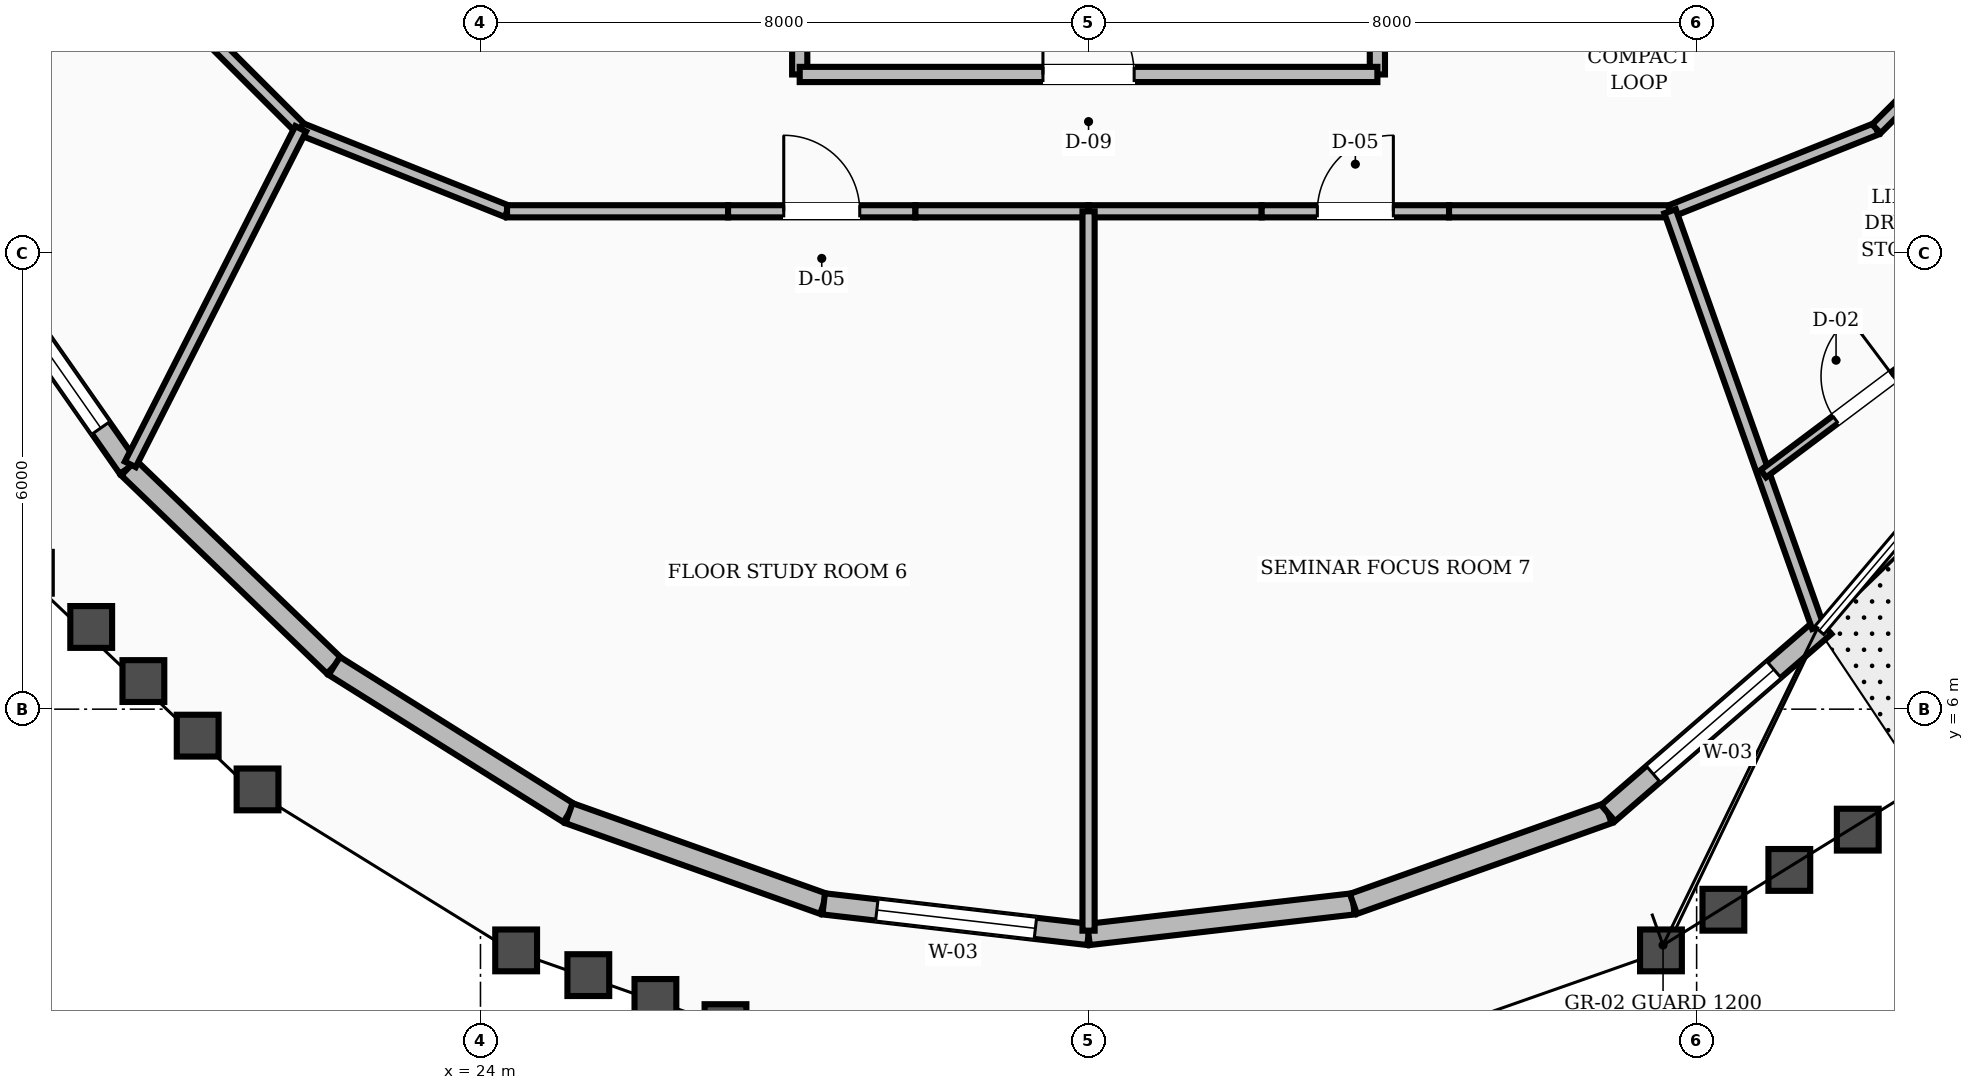
"""IFC4 building model, lengths in metres.
Left out: names, types, materials, properties, quantities, classifications, styles, units other than length and angle.
Written with IfcOpenShell. Run it as: python <this file> out.ifc"""

import sys

from ifc_helpers import new_model, si_unit, direction, frame, frame_2d, origin, place, context, subcontext, project, spatial, rectangle, extrude, element, fill, save


model = new_model("IFC4")
c1 = context("Model", 3, precision=1e-05, world=origin(), true_north=direction((0.0, 1.0)))
c2 = subcontext(c1, "Body", "Model", "MODEL_VIEW")
j1 = project(units=[si_unit("LENGTHUNIT", "METRE"), si_unit("PLANEANGLEUNIT", "RADIAN")], contexts=[c1])
p1 = place(None, origin())
s1 = spatial("IfcSite", under=j1, at=p1, CompositionType="ELEMENT")
p2 = place(p1, origin())
s2 = spatial("IfcBuilding", under=s1, at=p2, CompositionType="ELEMENT")
p3 = place(p2, frame((0.0, 0.0, 290.4)))
s3 = spatial("IfcBuildingStorey", under=s2, at=p3, CompositionType="ELEMENT", Elevation=290.4)
p4 = place(p3, frame((17.149, 12.353, 0.0), z_axis=(0.0, 0.0, 1.0), x_axis=(0.573022646369, -0.819539533365, 0.0)))
e1 = element("IfcWall", 1, at=p4, inside=s3, PredefinedType="STANDARD", context=c2, shape_type="SweptSolid", body=[
    extrude(rectangle(XDim=3.876, YDim=0.28, at=frame_2d((1.938, 0.0))), origin(), (0.0, 0.0, 1.0), 2.88),
])
p5 = place(p4, frame((0.638, 0.0, 0.8)))
e2 = element("IfcOpeningElement", 2, at=p5, cuts=e1, PredefinedType="OPENING", context=c2, shape_type="SweptSolid", body=[
    extrude(rectangle(XDim=2.6, YDim=1.65, at=frame_2d((1.3, 0.825))), frame((0.0, 0.15, 0.0), z_axis=(0.0, -1.0, 0.0), x_axis=(1.0, 0.0, 0.0)), (0.0, 0.0, 1.0), 0.3),
])
p6 = place(p3, frame((19.37, 9.176, 0.0), z_axis=(0.0, 0.0, 1.0), x_axis=(0.720234855693, -0.693730316943, 0.0)))
e3 = element("IfcWall", 3, at=p6, inside=s3, PredefinedType="STANDARD", context=c2, shape_type="SweptSolid", body=[
    extrude(rectangle(XDim=3.758, YDim=0.28, at=frame_2d((1.879, 0.0))), origin(), (0.0, 0.0, 1.0), 2.88),
])
p7 = place(p3, frame((22.077, 6.569, 0.0), z_axis=(0.0, 0.0, 1.0), x_axis=(0.847094045547, -0.531443014818, 0.0)))
e4 = element("IfcWall", 4, at=p7, inside=s3, PredefinedType="STANDARD", context=c2, shape_type="SweptSolid", body=[
    extrude(rectangle(XDim=3.645, YDim=0.28, at=frame_2d((1.823, 0.0))), origin(), (0.0, 0.0, 1.0), 2.88),
])
p8 = place(p3, frame((25.165, 4.632, 0.0), z_axis=(0.0, 0.0, 1.0), x_axis=(0.94207690039, -0.335396949527, 0.0)))
e5 = element("IfcWall", 5, at=p8, inside=s3, PredefinedType="STANDARD", context=c2, shape_type="SweptSolid", body=[
    extrude(rectangle(XDim=3.557, YDim=0.28, at=frame_2d((1.778, 0.0))), origin(), (0.0, 0.0, 1.0), 2.88),
])
p9 = place(p3, frame((28.515, 3.439, 0.0), z_axis=(0.0, 0.0, 1.0), x_axis=(0.993384223019, -0.114838083653, 0.0)))
e6 = element("IfcWall", 6, at=p9, inside=s3, PredefinedType="STANDARD", context=c2, shape_type="SweptSolid", body=[
    extrude(rectangle(XDim=3.508, YDim=0.28, at=frame_2d((1.754, 0.0))), origin(), (0.0, 0.0, 1.0), 2.88),
])
p10 = place(p9, frame((0.704, 0.0, 0.8)))
e7 = element("IfcOpeningElement", 7, at=p10, cuts=e6, PredefinedType="OPENING", context=c2, shape_type="SweptSolid", body=[
    extrude(rectangle(XDim=2.1, YDim=1.65, at=frame_2d((1.05, 0.825))), frame((0.0, 0.15, 0.0), z_axis=(0.0, -1.0, 0.0), x_axis=(1.0, 0.0, 0.0)), (0.0, 0.0, 1.0), 0.3),
])
p11 = place(p3, frame((32.0, 3.036, 0.0), z_axis=(0.0, 0.0, 1.0), x_axis=(0.993384223019, 0.114838083653, 0.0)))
e8 = element("IfcWall", 8, at=p11, inside=s3, PredefinedType="STANDARD", context=c2, shape_type="SweptSolid", body=[
    extrude(rectangle(XDim=3.508, YDim=0.28, at=frame_2d((1.754, 0.0))), origin(), (0.0, 0.0, 1.0), 2.88),
])
p12 = place(p3, frame((35.485, 3.439, 0.0), z_axis=(0.0, 0.0, 1.0), x_axis=(0.94207690039, 0.335396949527, 0.0)))
e9 = element("IfcWall", 9, at=p12, inside=s3, PredefinedType="STANDARD", context=c2, shape_type="SweptSolid", body=[
    extrude(rectangle(XDim=3.557, YDim=0.28, at=frame_2d((1.778, 0.0))), origin(), (0.0, 0.0, 1.0), 2.88),
])
p13 = place(p3, frame((38.835, 4.632, 0.0), z_axis=(0.0, 0.0, 1.0), x_axis=(0.756185346013, 0.654357488286, 0.0)))
e10 = element("IfcWall", 10, at=p13, inside=s3, PredefinedType="STANDARD", context=c2, shape_type="SweptSolid", body=[
    extrude(rectangle(XDim=3.764, YDim=0.28, at=frame_2d((1.882, 0.0))), origin(), (0.0, 0.0, 1.0), 2.88),
])
p14 = place(p13, frame((0.786, 0.0, 0.8)))
e11 = element("IfcOpeningElement", 11, at=p14, cuts=e10, PredefinedType="OPENING", context=c2, shape_type="SweptSolid", body=[
    extrude(rectangle(XDim=2.1, YDim=1.65, at=frame_2d((1.05, 0.825))), frame((0.0, 0.15, 0.0), z_axis=(0.0, -1.0, 0.0), x_axis=(1.0, 0.0, 0.0)), (0.0, 0.0, 1.0), 0.3),
])
for number, where, z_axis, x_axis in (
    (12, (28.2, 14.35, 0.0), (0.0, 0.0, 1.0), (0.0, 1.0, 0.0)),
    (13, (35.8, 14.35, 0.0), (0.0, 0.0, 1.0), (0.0, 1.0, 0.0)),
):
    element("IfcWall", number, at=place(p3, frame(where, z_axis=z_axis, x_axis=x_axis)), inside=s3, PredefinedType="SOLIDWALL", context=c2, shape_type="SweptSolid", body=[
        extrude(rectangle(XDim=2.2, YDim=0.2, at=frame_2d((1.1, 0.0))), origin(), (0.0, 0.0, 1.0), 2.87),
    ])
p15 = place(p3, frame((28.2, 14.35, 0.0), z_axis=(0.0, 0.0, 1.0), x_axis=(1.0, 0.0, 0.0)))
e14 = element("IfcWall", 14, at=p15, inside=s3, PredefinedType="SOLIDWALL", context=c2, shape_type="SweptSolid", body=[
    extrude(rectangle(XDim=7.6, YDim=0.2, at=frame_2d((3.8, 0.0))), origin(), (0.0, 0.0, 1.0), 2.87),
])
p16 = place(p15, frame((3.2, 0.0, 0.0)))
e15 = element("IfcOpeningElement", 15, at=p16, cuts=e14, PredefinedType="OPENING", context=c2, shape_type="SweptSolid", body=[
    extrude(rectangle(XDim=1.2, YDim=2.1, at=frame_2d((0.6, 1.05))), frame((0.0, 0.11, 0.0), z_axis=(0.0, -1.0, 0.0), x_axis=(1.0, 0.0, 0.0)), (0.0, 0.0, 1.0), 0.22),
])
p17 = place(p3, frame((19.573, 15.697, 0.0), z_axis=(0.0, 0.0, 1.0), x_axis=(0.707106781187, -0.707106781187, 0.0)))
e16 = element("IfcWall", 16, at=p17, inside=s3, PredefinedType="SOLIDWALL", context=c2, shape_type="SweptSolid", body=[
    extrude(rectangle(XDim=2.916, YDim=0.16, at=frame_2d((1.458, 0.0))), origin(), (0.0, 0.0, 1.0), 2.87),
])
p18 = place(p3, frame((21.635, 13.635, 0.0), z_axis=(0.0, 0.0, 1.0), x_axis=(0.92856882165, -0.371160266542, 0.0)))
e17 = element("IfcWall", 17, at=p18, inside=s3, PredefinedType="SOLIDWALL", context=c2, shape_type="SweptSolid", body=[
    extrude(rectangle(XDim=2.923, YDim=0.16, at=frame_2d((1.461, 0.0))), origin(), (0.0, 0.0, 1.0), 2.87),
])
p19 = place(p3, frame((24.349, 12.55, 0.0), z_axis=(0.0, 0.0, 1.0), x_axis=(1.0, 0.0, 0.0)))
e18 = element("IfcWall", 18, at=p19, inside=s3, PredefinedType="SOLIDWALL", context=c2, shape_type="SweptSolid", body=[
    extrude(rectangle(XDim=2.908, YDim=0.16, at=frame_2d((1.454, 0.0))), origin(), (0.0, 0.0, 1.0), 2.87),
])
p20 = place(p3, frame((27.257, 12.55, 0.0), z_axis=(0.0, 0.0, 1.0), x_axis=(1.0, 0.0, 0.0)))
e19 = element("IfcWall", 19, at=p20, inside=s3, PredefinedType="SOLIDWALL", context=c2, shape_type="SweptSolid", body=[
    extrude(rectangle(XDim=2.465, YDim=0.16, at=frame_2d((1.232, 0.0))), origin(), (0.0, 0.0, 1.0), 2.87),
])
p21 = place(p20, frame((0.733, 0.0, 0.0)))
e20 = element("IfcOpeningElement", 20, at=p21, cuts=e19, PredefinedType="OPENING", context=c2, shape_type="SweptSolid", body=[
    extrude(rectangle(XDim=1.0, YDim=2.1, at=frame_2d((0.5, 1.05))), frame((0.0, 0.09, 0.0), z_axis=(0.0, -1.0, 0.0), x_axis=(1.0, 0.0, 0.0)), (0.0, 0.0, 1.0), 0.18),
])
for number, where, z_axis, x_axis in (
    (21, (29.722, 12.55, 0.0), (0.0, 0.0, 1.0), (1.0, 0.0, 0.0)),
    (22, (32.0, 12.55, 0.0), (0.0, 0.0, 1.0), (1.0, 0.0, 0.0)),
):
    element("IfcWall", number, at=place(p3, frame(where, z_axis=z_axis, x_axis=x_axis)), inside=s3, PredefinedType="SOLIDWALL", context=c2, shape_type="SweptSolid", body=[
        extrude(rectangle(XDim=2.278, YDim=0.16, at=frame_2d((1.139, 0.0))), origin(), (0.0, 0.0, 1.0), 2.87),
    ])
p22 = place(p3, frame((34.278, 12.55, 0.0), z_axis=(0.0, 0.0, 1.0), x_axis=(1.0, 0.0, 0.0)))
e23 = element("IfcWall", 23, at=p22, inside=s3, PredefinedType="SOLIDWALL", context=c2, shape_type="SweptSolid", body=[
    extrude(rectangle(XDim=2.465, YDim=0.16, at=frame_2d((1.232, 0.0))), origin(), (0.0, 0.0, 1.0), 2.87),
])
p23 = place(p22, frame((0.733, 0.0, 0.0)))
e24 = element("IfcOpeningElement", 24, at=p23, cuts=e23, PredefinedType="OPENING", context=c2, shape_type="SweptSolid", body=[
    extrude(rectangle(XDim=1.0, YDim=2.1, at=frame_2d((0.5, 1.05))), frame((0.0, 0.09, 0.0), z_axis=(0.0, -1.0, 0.0), x_axis=(1.0, 0.0, 0.0)), (0.0, 0.0, 1.0), 0.18),
])
p24 = place(p3, frame((36.743, 12.55, 0.0), z_axis=(0.0, 0.0, 1.0), x_axis=(1.0, 0.0, 0.0)))
e25 = element("IfcWall", 25, at=p24, inside=s3, PredefinedType="SOLIDWALL", context=c2, shape_type="SweptSolid", body=[
    extrude(rectangle(XDim=2.908, YDim=0.16, at=frame_2d((1.454, 0.0))), origin(), (0.0, 0.0, 1.0), 2.87),
])
p25 = place(p3, frame((39.651, 12.55, 0.0), z_axis=(0.0, 0.0, 1.0), x_axis=(0.92856882165, 0.371160266542, 0.0)))
e26 = element("IfcWall", 26, at=p25, inside=s3, PredefinedType="SOLIDWALL", context=c2, shape_type="SweptSolid", body=[
    extrude(rectangle(XDim=2.923, YDim=0.16, at=frame_2d((1.461, 0.0))), origin(), (0.0, 0.0, 1.0), 2.87),
])
p26 = place(p3, frame((42.365, 13.635, 0.0), z_axis=(0.0, 0.0, 1.0), x_axis=(0.707106781187, 0.707106781187, 0.0)))
e27 = element("IfcWall", 27, at=p26, inside=s3, PredefinedType="SOLIDWALL", context=c2, shape_type="SweptSolid", body=[
    extrude(rectangle(XDim=2.916, YDim=0.16, at=frame_2d((1.458, 0.0))), origin(), (0.0, 0.0, 1.0), 2.87),
])
p27 = place(p26, frame((0.983, 0.0, 0.0)))
e28 = element("IfcOpeningElement", 28, at=p27, cuts=e27, PredefinedType="OPENING", context=c2, shape_type="SweptSolid", body=[
    extrude(rectangle(XDim=0.95, YDim=2.1, at=frame_2d((0.475, 1.05))), frame((0.0, 0.09, 0.0), z_axis=(0.0, -1.0, 0.0), x_axis=(1.0, 0.0, 0.0)), (0.0, 0.0, 1.0), 0.18),
])
p28 = place(p3, frame((21.635, 13.635, 0.0), z_axis=(0.0, 0.0, 1.0), x_axis=(-0.452865456809, -0.891578868093, 0.0)))
e29 = element("IfcWall", 29, at=p28, inside=s3, PredefinedType="SOLIDWALL", context=c2, shape_type="SweptSolid", body=[
    extrude(rectangle(XDim=4.951, YDim=0.16, at=frame_2d((2.476, 0.0))), origin(), (0.0, 0.0, 1.0), 2.87),
])
p29 = place(p3, frame((32.0, 12.55, 0.0), z_axis=(0.0, 0.0, 1.0), x_axis=(0.0, -1.0, 0.0)))
e30 = element("IfcWall", 30, at=p29, inside=s3, PredefinedType="SOLIDWALL", context=c2, shape_type="SweptSolid", body=[
    extrude(rectangle(XDim=9.464, YDim=0.16, at=frame_2d((4.732, 0.0))), origin(), (0.0, 0.0, 1.0), 2.87),
])
p30 = place(p3, frame((39.651, 12.55, 0.0), z_axis=(0.0, 0.0, 1.0), x_axis=(0.335043691545, -0.942202592204, 0.0)))
e31 = element("IfcWall", 31, at=p30, inside=s3, PredefinedType="SOLIDWALL", context=c2, shape_type="SweptSolid", body=[
    extrude(rectangle(XDim=5.804, YDim=0.16, at=frame_2d((2.902, 0.0))), origin(), (0.0, 0.0, 1.0), 2.87),
])
p31 = place(p3, frame((40.878, 9.098, 0.0), z_axis=(0.0, 0.0, 1.0), x_axis=(0.79971765819, 0.600376271332, 0.0)))
e32 = element("IfcWall", 32, at=p31, inside=s3, PredefinedType="PARTITIONING", context=c2, shape_type="SweptSolid", body=[
    extrude(rectangle(XDim=3.322, YDim=0.12, at=frame_2d((1.661, 0.0))), origin(), (0.0, 0.0, 1.0), 2.87),
])
p32 = place(p31, frame((1.186, 0.0, 0.0)))
e33 = element("IfcOpeningElement", 33, at=p32, cuts=e32, PredefinedType="OPENING", context=c2, shape_type="SweptSolid", body=[
    extrude(rectangle(XDim=0.95, YDim=2.1, at=frame_2d((0.475, 1.05))), frame((0.0, 0.07, 0.0), z_axis=(0.0, -1.0, 0.0), x_axis=(1.0, 0.0, 0.0)), (0.0, 0.0, 1.0), 0.14),
])
p33 = place(p5, origin())
e34 = element("IfcWindow", 34, at=p33, inside=s3, PartitioningType="SINGLE_PANEL", PredefinedType="WINDOW", context=c2, shape_type="SweptSolid", body=[
    extrude(rectangle(XDim=2.6, YDim=1.65, at=frame_2d((1.3, 0.825))), frame((0.0, 0.03, 0.0), z_axis=(0.0, -1.0, 0.0), x_axis=(1.0, 0.0, 0.0)), (0.0, 0.0, 1.0), 0.06),
])
fill(e2, e34)
p34 = place(p10, origin())
e35 = element("IfcWindow", 35, at=p34, inside=s3, PartitioningType="SINGLE_PANEL", PredefinedType="WINDOW", context=c2, shape_type="SweptSolid", body=[
    extrude(rectangle(XDim=2.1, YDim=1.65, at=frame_2d((1.05, 0.825))), frame((0.0, 0.03, 0.0), z_axis=(0.0, -1.0, 0.0), x_axis=(1.0, 0.0, 0.0)), (0.0, 0.0, 1.0), 0.06),
])
fill(e7, e35)
p35 = place(p14, origin())
e36 = element("IfcWindow", 36, at=p35, inside=s3, PartitioningType="SINGLE_PANEL", PredefinedType="WINDOW", context=c2, shape_type="SweptSolid", body=[
    extrude(rectangle(XDim=2.1, YDim=1.65, at=frame_2d((1.05, 0.825))), frame((0.0, 0.03, 0.0), z_axis=(0.0, -1.0, 0.0), x_axis=(1.0, 0.0, 0.0)), (0.0, 0.0, 1.0), 0.06),
])
fill(e11, e36)
p36 = place(p16, origin())
e37 = element("IfcDoor", 37, at=p36, inside=s3, OperationType="SINGLE_SWING_LEFT", PredefinedType="DOOR", context=c2, shape_type="SweptSolid", body=[
    extrude(rectangle(XDim=1.2, YDim=2.1, at=frame_2d((0.6, 1.05))), frame((0.0, 0.025, 0.0), z_axis=(0.0, -1.0, 0.0), x_axis=(1.0, 0.0, 0.0)), (0.0, 0.0, 1.0), 0.05),
])
fill(e15, e37)
p37 = place(p21, origin())
e38 = element("IfcDoor", 38, at=p37, inside=s3, OperationType="SINGLE_SWING_LEFT", PredefinedType="DOOR", context=c2, shape_type="SweptSolid", body=[
    extrude(rectangle(XDim=1.0, YDim=2.1, at=frame_2d((0.5, 1.05))), frame((0.0, 0.025, 0.0), z_axis=(0.0, -1.0, 0.0), x_axis=(1.0, 0.0, 0.0)), (0.0, 0.0, 1.0), 0.05),
])
fill(e20, e38)
p38 = place(p23, origin())
e39 = element("IfcDoor", 39, at=p38, inside=s3, OperationType="SINGLE_SWING_RIGHT", PredefinedType="DOOR", context=c2, shape_type="SweptSolid", body=[
    extrude(rectangle(XDim=1.0, YDim=2.1, at=frame_2d((0.5, 1.05))), frame((0.0, 0.025, 0.0), z_axis=(0.0, -1.0, 0.0), x_axis=(1.0, 0.0, 0.0)), (0.0, 0.0, 1.0), 0.05),
])
fill(e24, e39)
p39 = place(p32, origin())
e40 = element("IfcDoor", 40, at=p39, inside=s3, OperationType="SINGLE_SWING_RIGHT", PredefinedType="DOOR", context=c2, shape_type="SweptSolid", body=[
    extrude(rectangle(XDim=0.95, YDim=2.1, at=frame_2d((0.475, 1.05))), frame((0.0, 0.025, 0.0), z_axis=(0.0, -1.0, 0.0), x_axis=(1.0, 0.0, 0.0)), (0.0, 0.0, 1.0), 0.05),
])
fill(e33, e40)
save(model, sys.argv[1])
